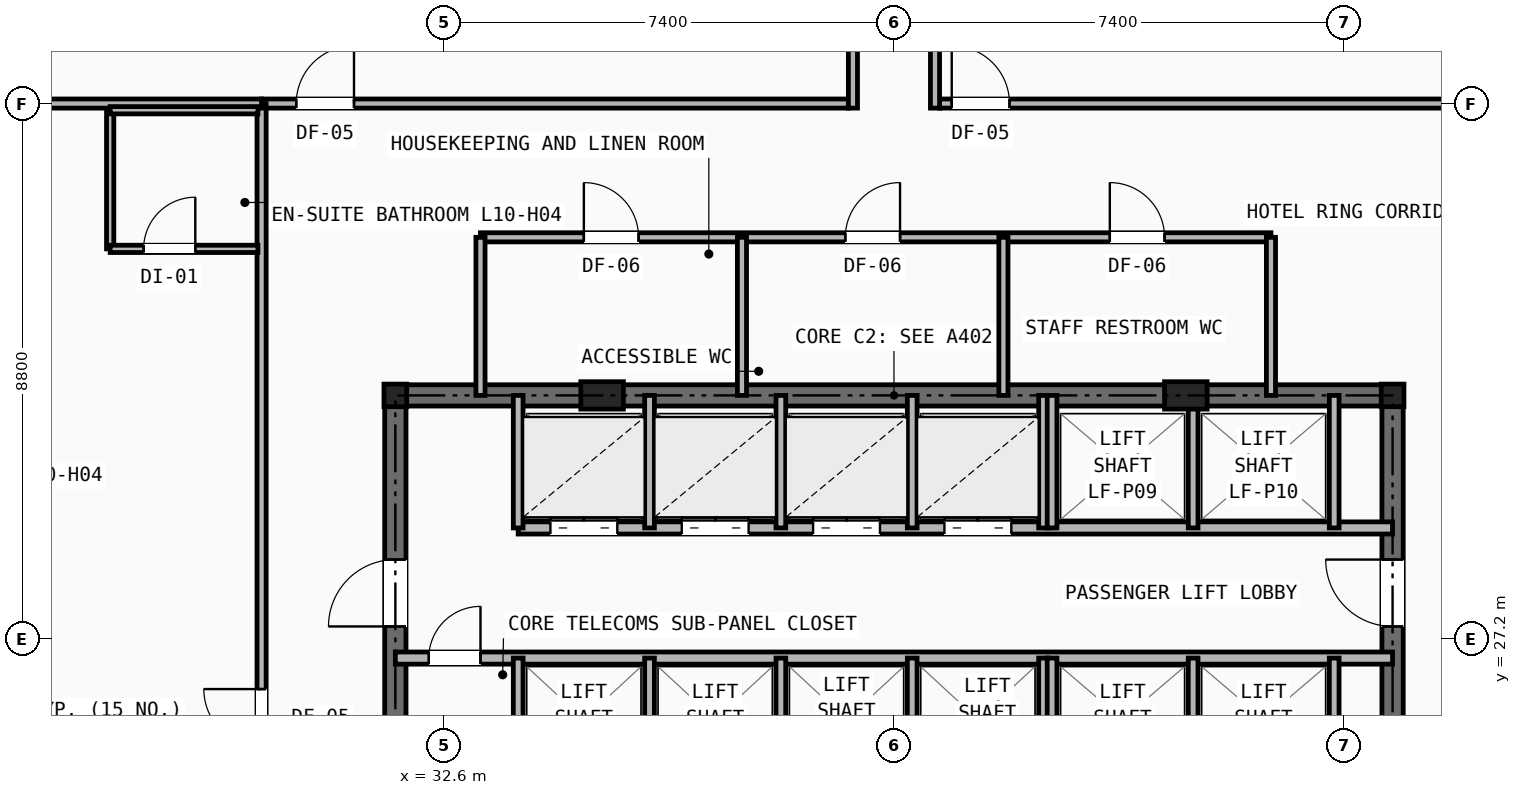
"""IFC4 building model, lengths in metres.
Left out: names, types, materials, properties, quantities, classifications, styles, units other than length and angle.
Written with IfcOpenShell. Run it as: python <this file> out.ifc"""

import sys

from ifc_helpers import new_model, si_unit, direction, frame, frame_2d, origin, origin_2d, place, context, subcontext, project, spatial, rectangle, i_section, extrude, element, fill, save


model = new_model("IFC4")
c1 = context("Model", 3, precision=1e-05, world=origin(), true_north=direction((0.0, 1.0)))
c2 = subcontext(c1, "Body", "Model", "MODEL_VIEW")
j1 = project(units=[si_unit("LENGTHUNIT", "METRE"), si_unit("PLANEANGLEUNIT", "RADIAN")], contexts=[c1])
p1 = place(None, origin())
s1 = spatial("IfcSite", under=j1, at=p1, CompositionType="ELEMENT")
p2 = place(p1, origin())
s2 = spatial("IfcBuilding", under=s1, at=p2, CompositionType="ELEMENT")
p3 = place(p2, frame((0.0, 0.0, 40.0)))
s3 = spatial("IfcBuildingStorey", under=s2, at=p3, CompositionType="ELEMENT", Elevation=40.0)
for number, where, z_axis, x_axis in (
    (1, (31.8, 31.2, 0.0), (0.0, 0.0, 1.0), (1.0, 0.0, 0.0)),
    (2, (48.2, 31.2, 0.0), (0.0, 0.0, 1.0), (1.0, 0.0, 0.0)),
):
    element("IfcColumn", number, at=place(p3, frame(where, z_axis=z_axis, x_axis=x_axis)), inside=s3, PredefinedType="COLUMN", context=c2, shape_type="SweptSolid", body=[
        extrude(i_section(OverallWidth=0.374, OverallDepth=0.372, WebThickness=0.016, FlangeThickness=0.026, at=origin_2d()), origin(), (0.0, 0.0, 1.0), 3.2),
    ])
for number, where, z_axis, x_axis in (
    (3, (35.2, 31.2, 0.0), (0.0, 0.0, 1.0), (1.0, 0.0, 0.0)),
    (4, (44.8, 31.2, 0.0), (0.0, 0.0, 1.0), (1.0, 0.0, 0.0)),
):
    element("IfcColumn", number, at=place(p3, frame(where, z_axis=z_axis, x_axis=x_axis)), inside=s3, PredefinedType="PILASTER", context=c2, shape_type="SweptSolid", body=[
        extrude(rectangle(XDim=0.7, YDim=0.45, at=origin_2d()), origin(), (0.0, 0.0, 1.0), 3.2),
    ])
p4 = place(p3, frame((31.8, 31.2, 0.0), z_axis=(0.0, 0.0, 1.0), x_axis=(1.0, 0.0, 0.0)))
e5 = element("IfcWall", 5, at=p4, inside=s3, PredefinedType="SHEAR", context=c2, shape_type="SweptSolid", body=[
    extrude(rectangle(XDim=16.4, YDim=0.35, at=frame_2d((8.2, 0.0))), origin(), (0.0, 0.0, 1.0), 2.98),
])
p5 = place(p3, frame((31.8, 16.4, 0.0), z_axis=(0.0, 0.0, 1.0), x_axis=(0.0, 1.0, 0.0)))
e6 = element("IfcWall", 6, at=p5, inside=s3, PredefinedType="SHEAR", context=c2, shape_type="SweptSolid", body=[
    extrude(rectangle(XDim=14.8, YDim=0.35, at=frame_2d((7.4, 0.0))), origin(), (0.0, 0.0, 1.0), 2.98),
])
p6 = place(p5, frame((11.0, 0.0, 0.0)))
e7 = element("IfcOpeningElement", 7, at=p6, cuts=e6, PredefinedType="OPENING", context=c2, shape_type="SweptSolid", body=[
    extrude(rectangle(XDim=1.1, YDim=2.15, at=frame_2d((0.55, 1.075))), frame((0.0, 0.185, 0.0), z_axis=(0.0, -1.0, 0.0), x_axis=(1.0, 0.0, 0.0)), (0.0, 0.0, 1.0), 0.37),
])
p7 = place(p3, frame((48.2, 16.4, 0.0), z_axis=(0.0, 0.0, 1.0), x_axis=(0.0, 1.0, 0.0)))
e8 = element("IfcWall", 8, at=p7, inside=s3, PredefinedType="SHEAR", context=c2, shape_type="SweptSolid", body=[
    extrude(rectangle(XDim=14.8, YDim=0.35, at=frame_2d((7.4, 0.0))), origin(), (0.0, 0.0, 1.0), 2.98),
])
p8 = place(p7, frame((11.0, 0.0, 0.0)))
e9 = element("IfcOpeningElement", 9, at=p8, cuts=e8, PredefinedType="OPENING", context=c2, shape_type="SweptSolid", body=[
    extrude(rectangle(XDim=1.1, YDim=2.15, at=frame_2d((0.55, 1.075))), frame((0.0, 0.185, 0.0), z_axis=(0.0, -1.0, 0.0), x_axis=(1.0, 0.0, 0.0)), (0.0, 0.0, 1.0), 0.37),
])
p9 = place(p3, frame((33.82, 29.02, 0.0), z_axis=(0.0, 0.0, 1.0), x_axis=(1.0, 0.0, 0.0)))
e10 = element("IfcWall", 10, at=p9, inside=s3, PredefinedType="SOLIDWALL", context=c2, shape_type="SweptSolid", body=[
    extrude(rectangle(XDim=14.38, YDim=0.2, at=frame_2d((7.19, 0.0))), origin(), (0.0, 0.0, 1.0), 2.431),
])
p10 = place(p9, frame((0.53, 0.0, 0.0)))
e11 = element("IfcOpeningElement", 11, at=p10, cuts=e10, PredefinedType="OPENING", context=c2, shape_type="SweptSolid", body=[
    extrude(rectangle(XDim=1.1, YDim=2.15, at=frame_2d((0.55, 1.075))), frame((0.0, 0.11, 0.0), z_axis=(0.0, -1.0, 0.0), x_axis=(1.0, 0.0, 0.0)), (0.0, 0.0, 1.0), 0.22),
])
p11 = place(p9, frame((2.69, 0.0, 0.0)))
e12 = element("IfcOpeningElement", 12, at=p11, cuts=e10, PredefinedType="OPENING", context=c2, shape_type="SweptSolid", body=[
    extrude(rectangle(XDim=1.1, YDim=2.15, at=frame_2d((0.55, 1.075))), frame((0.0, 0.11, 0.0), z_axis=(0.0, -1.0, 0.0), x_axis=(1.0, 0.0, 0.0)), (0.0, 0.0, 1.0), 0.22),
])
p12 = place(p9, frame((4.85, 0.0, 0.0)))
e13 = element("IfcOpeningElement", 13, at=p12, cuts=e10, PredefinedType="OPENING", context=c2, shape_type="SweptSolid", body=[
    extrude(rectangle(XDim=1.1, YDim=2.15, at=frame_2d((0.55, 1.075))), frame((0.0, 0.11, 0.0), z_axis=(0.0, -1.0, 0.0), x_axis=(1.0, 0.0, 0.0)), (0.0, 0.0, 1.0), 0.22),
])
p13 = place(p9, frame((7.01, 0.0, 0.0)))
e14 = element("IfcOpeningElement", 14, at=p13, cuts=e10, PredefinedType="OPENING", context=c2, shape_type="SweptSolid", body=[
    extrude(rectangle(XDim=1.1, YDim=2.15, at=frame_2d((0.55, 1.075))), frame((0.0, 0.11, 0.0), z_axis=(0.0, -1.0, 0.0), x_axis=(1.0, 0.0, 0.0)), (0.0, 0.0, 1.0), 0.22),
])
p14 = place(p3, frame((31.8, 26.88, 0.0), z_axis=(0.0, 0.0, 1.0), x_axis=(1.0, 0.0, 0.0)))
e15 = element("IfcWall", 15, at=p14, inside=s3, PredefinedType="SOLIDWALL", context=c2, shape_type="SweptSolid", body=[
    extrude(rectangle(XDim=16.4, YDim=0.2, at=frame_2d((8.2, 0.0))), origin(), (0.0, 0.0, 1.0), 2.431),
])
p15 = place(p14, frame((0.55, 0.0, 0.0)))
e16 = element("IfcOpeningElement", 16, at=p15, cuts=e15, PredefinedType="OPENING", context=c2, shape_type="SweptSolid", body=[
    extrude(rectangle(XDim=0.85, YDim=2.05, at=frame_2d((0.425, 1.025))), frame((0.0, 0.11, 0.0), z_axis=(0.0, -1.0, 0.0), x_axis=(1.0, 0.0, 0.0)), (0.0, 0.0, 1.0), 0.22),
])
p16 = place(p3, frame((33.82, 29.02, 0.0), z_axis=(0.0, 0.0, 1.0), x_axis=(0.0, 1.0, 0.0)))
e17 = element("IfcWall", 17, at=p16, inside=s3, PredefinedType="SOLIDWALL", context=c2, shape_type="SweptSolid", body=[
    extrude(rectangle(XDim=2.18, YDim=0.16, at=frame_2d((1.09, 0.0))), origin(), (0.0, 0.0, 1.0), 2.708),
])
p17 = place(p3, frame((33.82, 24.8, 0.0), z_axis=(0.0, 0.0, 1.0), x_axis=(0.0, 1.0, 0.0)))
e18 = element("IfcWall", 18, at=p17, inside=s3, PredefinedType="SOLIDWALL", context=c2, shape_type="SweptSolid", body=[
    extrude(rectangle(XDim=2.08, YDim=0.16, at=frame_2d((1.04, 0.0))), origin(), (0.0, 0.0, 1.0), 2.98),
])
for number, where, z_axis, x_axis in (
    (19, (35.98, 29.02, 0.0), (0.0, 0.0, 1.0), (0.0, 1.0, 0.0)),
    (20, (38.14, 29.02, 0.0), (0.0, 0.0, 1.0), (0.0, 1.0, 0.0)),
    (21, (40.3, 29.02, 0.0), (0.0, 0.0, 1.0), (0.0, 1.0, 0.0)),
    (22, (42.46, 29.02, 0.0), (0.0, 0.0, 1.0), (0.0, 1.0, 0.0)),
):
    element("IfcWall", number, at=place(p3, frame(where, z_axis=z_axis, x_axis=x_axis)), inside=s3, PredefinedType="SOLIDWALL", context=c2, shape_type="SweptSolid", body=[
        extrude(rectangle(XDim=2.18, YDim=0.16, at=frame_2d((1.09, 0.0))), origin(), (0.0, 0.0, 1.0), 2.708),
    ])
for number, where, z_axis, x_axis in (
    (23, (35.98, 24.8, 0.0), (0.0, 0.0, 1.0), (0.0, 1.0, 0.0)),
    (24, (38.14, 24.8, 0.0), (0.0, 0.0, 1.0), (0.0, 1.0, 0.0)),
    (25, (40.3, 24.8, 0.0), (0.0, 0.0, 1.0), (0.0, 1.0, 0.0)),
    (26, (42.46, 24.8, 0.0), (0.0, 0.0, 1.0), (0.0, 1.0, 0.0)),
):
    element("IfcWall", number, at=place(p3, frame(where, z_axis=z_axis, x_axis=x_axis)), inside=s3, PredefinedType="SOLIDWALL", context=c2, shape_type="SweptSolid", body=[
        extrude(rectangle(XDim=2.08, YDim=0.16, at=frame_2d((1.04, 0.0))), origin(), (0.0, 0.0, 1.0), 2.98),
    ])
for number, where, z_axis, x_axis in (
    (27, (42.6, 29.02, 0.0), (0.0, 0.0, 1.0), (0.0, 1.0, 0.0)),
    (28, (44.92, 29.02, 0.0), (0.0, 0.0, 1.0), (0.0, 1.0, 0.0)),
    (29, (47.24, 29.02, 0.0), (0.0, 0.0, 1.0), (0.0, 1.0, 0.0)),
):
    element("IfcWall", number, at=place(p3, frame(where, z_axis=z_axis, x_axis=x_axis)), inside=s3, PredefinedType="SOLIDWALL", context=c2, shape_type="SweptSolid", body=[
        extrude(rectangle(XDim=2.18, YDim=0.16, at=frame_2d((1.09, 0.0))), origin(), (0.0, 0.0, 1.0), 2.708),
    ])
for number, where, z_axis, x_axis in (
    (30, (42.6, 24.8, 0.0), (0.0, 0.0, 1.0), (0.0, 1.0, 0.0)),
    (31, (44.92, 24.8, 0.0), (0.0, 0.0, 1.0), (0.0, 1.0, 0.0)),
    (32, (47.24, 24.8, 0.0), (0.0, 0.0, 1.0), (0.0, 1.0, 0.0)),
):
    element("IfcWall", number, at=place(p3, frame(where, z_axis=z_axis, x_axis=x_axis)), inside=s3, PredefinedType="SOLIDWALL", context=c2, shape_type="SweptSolid", body=[
        extrude(rectangle(XDim=2.08, YDim=0.16, at=frame_2d((1.04, 0.0))), origin(), (0.0, 0.0, 1.0), 2.98),
    ])
p18 = place(p3, frame((33.2, 33.8, 0.0), z_axis=(0.0, 0.0, 1.0), x_axis=(1.0, 0.0, 0.0)))
e33 = element("IfcWall", 33, at=p18, inside=s3, PredefinedType="PARTITIONING", context=c2, shape_type="SweptSolid", body=[
    extrude(rectangle(XDim=13.0, YDim=0.15, at=frame_2d((6.5, 0.0))), origin(), (0.0, 0.0, 1.0), 2.98),
])
p19 = place(p18, frame((1.7, 0.0, 0.0)))
e34 = element("IfcOpeningElement", 34, at=p19, cuts=e33, PredefinedType="OPENING", context=c2, shape_type="SweptSolid", body=[
    extrude(rectangle(XDim=0.9, YDim=2.1, at=frame_2d((0.45, 1.05))), frame((0.0, 0.085, 0.0), z_axis=(0.0, -1.0, 0.0), x_axis=(1.0, 0.0, 0.0)), (0.0, 0.0, 1.0), 0.17),
])
p20 = place(p18, frame((6.0, 0.0, 0.0)))
e35 = element("IfcOpeningElement", 35, at=p20, cuts=e33, PredefinedType="OPENING", context=c2, shape_type="SweptSolid", body=[
    extrude(rectangle(XDim=0.9, YDim=2.1, at=frame_2d((0.45, 1.05))), frame((0.0, 0.085, 0.0), z_axis=(0.0, -1.0, 0.0), x_axis=(1.0, 0.0, 0.0)), (0.0, 0.0, 1.0), 0.17),
])
p21 = place(p18, frame((10.35, 0.0, 0.0)))
e36 = element("IfcOpeningElement", 36, at=p21, cuts=e33, PredefinedType="OPENING", context=c2, shape_type="SweptSolid", body=[
    extrude(rectangle(XDim=0.9, YDim=2.1, at=frame_2d((0.45, 1.05))), frame((0.0, 0.085, 0.0), z_axis=(0.0, -1.0, 0.0), x_axis=(1.0, 0.0, 0.0)), (0.0, 0.0, 1.0), 0.17),
])
for number, where, z_axis, x_axis in (
    (37, (33.2, 31.2, 0.0), (0.0, 0.0, 1.0), (0.0, 1.0, 0.0)),
    (38, (46.2, 31.2, 0.0), (0.0, 0.0, 1.0), (0.0, 1.0, 0.0)),
    (39, (37.5, 31.2, 0.0), (0.0, 0.0, 1.0), (0.0, 1.0, 0.0)),
    (40, (41.8, 31.2, 0.0), (0.0, 0.0, 1.0), (0.0, 1.0, 0.0)),
):
    element("IfcWall", number, at=place(p3, frame(where, z_axis=z_axis, x_axis=x_axis)), inside=s3, PredefinedType="PARTITIONING", context=c2, shape_type="SweptSolid", body=[
        extrude(rectangle(XDim=2.6, YDim=0.15, at=frame_2d((1.3, 0.0))), origin(), (0.0, 0.0, 1.0), 2.708),
    ])
p22 = place(p3, frame((29.6, 36.0, 0.0), z_axis=(0.0, 0.0, 1.0), x_axis=(1.0, 0.0, 0.0)))
e41 = element("IfcWall", 41, at=p22, inside=s3, PredefinedType="PARTITIONING", context=c2, shape_type="SweptSolid", body=[
    extrude(rectangle(XDim=9.65, YDim=0.15, at=frame_2d((4.825, 0.0))), origin(), (0.0, 0.0, 1.0), 2.98),
])
p23 = place(p22, frame((0.57, 0.0, 0.0)))
e42 = element("IfcOpeningElement", 42, at=p23, cuts=e41, PredefinedType="OPENING", context=c2, shape_type="SweptSolid", body=[
    extrude(rectangle(XDim=0.95, YDim=2.1, at=frame_2d((0.475, 1.05))), frame((0.0, 0.085, 0.0), z_axis=(0.0, -1.0, 0.0), x_axis=(1.0, 0.0, 0.0)), (0.0, 0.0, 1.0), 0.17),
])
p24 = place(p3, frame((40.75, 36.0, 0.0), z_axis=(0.0, 0.0, 1.0), x_axis=(1.0, 0.0, 0.0)))
e43 = element("IfcWall", 43, at=p24, inside=s3, PredefinedType="PARTITIONING", context=c2, shape_type="SweptSolid", body=[
    extrude(rectangle(XDim=9.65, YDim=0.15, at=frame_2d((4.825, 0.0))), origin(), (0.0, 0.0, 1.0), 2.513),
])
p25 = place(p24, frame((0.2, 0.0, 0.0)))
e44 = element("IfcOpeningElement", 44, at=p25, cuts=e43, PredefinedType="OPENING", context=c2, shape_type="SweptSolid", body=[
    extrude(rectangle(XDim=0.95, YDim=2.1, at=frame_2d((0.475, 1.05))), frame((0.0, 0.085, 0.0), z_axis=(0.0, -1.0, 0.0), x_axis=(1.0, 0.0, 0.0)), (0.0, 0.0, 1.0), 0.17),
])
p26 = place(p3, frame((29.6, 14.1, 0.0), z_axis=(0.0, 0.0, 1.0), x_axis=(0.0, 1.0, 0.0)))
e45 = element("IfcWall", 45, at=p26, inside=s3, PredefinedType="PARTITIONING", context=c2, shape_type="SweptSolid", body=[
    extrude(rectangle(XDim=21.9, YDim=0.15, at=frame_2d((10.95, 0.0))), origin(), (0.0, 0.0, 1.0), 2.431),
])
p27 = place(p26, frame((0.42, 0.0, 0.0)))
e46 = element("IfcOpeningElement", 46, at=p27, cuts=e45, PredefinedType="OPENING", context=c2, shape_type="SweptSolid", body=[
    extrude(rectangle(XDim=0.95, YDim=2.1, at=frame_2d((0.475, 1.05))), frame((0.0, 0.085, 0.0), z_axis=(0.0, -1.0, 0.0), x_axis=(1.0, 0.0, 0.0)), (0.0, 0.0, 1.0), 0.17),
])
p28 = place(p26, frame((11.32, 0.0, 0.0)))
e47 = element("IfcOpeningElement", 47, at=p28, cuts=e45, PredefinedType="OPENING", context=c2, shape_type="SweptSolid", body=[
    extrude(rectangle(XDim=0.95, YDim=2.1, at=frame_2d((0.475, 1.05))), frame((0.0, 0.085, 0.0), z_axis=(0.0, -1.0, 0.0), x_axis=(1.0, 0.0, 0.0)), (0.0, 0.0, 1.0), 0.17),
])
p29 = place(p3, frame((22.166, 36.0, 0.0), z_axis=(0.0, 0.0, 1.0), x_axis=(1.0, 0.0, 0.0)))
e48 = element("IfcWall", 48, at=p29, inside=s3, PredefinedType="PARTITIONING", context=c2, shape_type="SweptSolid", body=[
    extrude(rectangle(XDim=7.434, YDim=0.15, at=frame_2d((3.717, 0.0))), origin(), (0.0, 0.0, 1.0), 2.268),
])
p30 = place(p3, frame((27.11, 33.61, 0.0), z_axis=(0.0, 0.0, 1.0), x_axis=(0.0, 1.0, 0.0)))
e49 = element("IfcWall", 49, at=p30, inside=s3, PredefinedType="PARTITIONING", context=c2, shape_type="SweptSolid", body=[
    extrude(rectangle(XDim=2.28, YDim=0.12, at=frame_2d((1.14, 0.0))), origin(), (0.0, 0.0, 1.0), 2.513),
])
p31 = place(p3, frame((27.11, 33.61, 0.0), z_axis=(0.0, 0.0, 1.0), x_axis=(1.0, 0.0, 0.0)))
e50 = element("IfcWall", 50, at=p31, inside=s3, PredefinedType="PARTITIONING", context=c2, shape_type="SweptSolid", body=[
    extrude(rectangle(XDim=2.43, YDim=0.12, at=frame_2d((1.215, 0.0))), origin(), (0.0, 0.0, 1.0), 2.513),
])
p32 = place(p31, frame((0.55, 0.0, 0.0)))
e51 = element("IfcOpeningElement", 51, at=p32, cuts=e50, PredefinedType="OPENING", context=c2, shape_type="SweptSolid", body=[
    extrude(rectangle(XDim=0.85, YDim=2.05, at=frame_2d((0.425, 1.025))), frame((0.0, 0.07, 0.0), z_axis=(0.0, -1.0, 0.0), x_axis=(1.0, 0.0, 0.0)), (0.0, 0.0, 1.0), 0.14),
])
p33 = place(p3, frame((27.11, 35.89, 0.0), z_axis=(0.0, 0.0, 1.0), x_axis=(1.0, 0.0, 0.0)))
e52 = element("IfcWall", 52, at=p33, inside=s3, PredefinedType="PARTITIONING", context=c2, shape_type="SweptSolid", body=[
    extrude(rectangle(XDim=2.43, YDim=0.12, at=frame_2d((1.215, 0.0))), origin(), (0.0, 0.0, 1.0), 2.513),
])
for number, where, z_axis, x_axis in (
    (53, (39.325, 35.925, 0.0), (0.0, 0.0, 1.0), (0.0, 1.0, 0.0)),
    (54, (40.675, 35.925, 0.0), (0.0, 0.0, 1.0), (0.0, 1.0, 0.0)),
):
    element("IfcWall", number, at=place(p3, frame(where, z_axis=z_axis, x_axis=x_axis)), inside=s3, PredefinedType="PARTITIONING", context=c2, shape_type="SweptSolid", body=[
        extrude(rectangle(XDim=2.525, YDim=0.15, at=frame_2d((1.262, 0.0))), origin(), (0.0, 0.0, 1.0), 2.98),
    ])
p34 = place(p15, origin())
e55 = element("IfcDoor", 55, at=p34, inside=s3, OperationType="SINGLE_SWING_RIGHT", PredefinedType="DOOR", context=c2, shape_type="SweptSolid", body=[
    extrude(rectangle(XDim=0.85, YDim=2.05, at=frame_2d((0.425, 1.025))), frame((0.0, 0.025, 0.0), z_axis=(0.0, -1.0, 0.0), x_axis=(1.0, 0.0, 0.0)), (0.0, 0.0, 1.0), 0.05),
])
fill(e16, e55)
p35 = place(p6, origin())
e56 = element("IfcDoor", 56, at=p35, inside=s3, OperationType="SINGLE_SWING_LEFT", PredefinedType="DOOR", context=c2, shape_type="SweptSolid", body=[
    extrude(rectangle(XDim=1.1, YDim=2.15, at=frame_2d((0.55, 1.075))), frame((0.0, 0.025, 0.0), z_axis=(0.0, -1.0, 0.0), x_axis=(1.0, 0.0, 0.0)), (0.0, 0.0, 1.0), 0.05),
])
fill(e7, e56)
p36 = place(p8, origin())
e57 = element("IfcDoor", 57, at=p36, inside=s3, OperationType="SINGLE_SWING_RIGHT", PredefinedType="DOOR", context=c2, shape_type="SweptSolid", body=[
    extrude(rectangle(XDim=1.1, YDim=2.15, at=frame_2d((0.55, 1.075))), frame((0.0, 0.025, 0.0), z_axis=(0.0, -1.0, 0.0), x_axis=(1.0, 0.0, 0.0)), (0.0, 0.0, 1.0), 0.05),
])
fill(e9, e57)
p37 = place(p10, origin())
e58 = element("IfcDoor", 58, at=p37, inside=s3, OperationType="DOUBLE_DOOR_SLIDING", PredefinedType="DOOR", context=c2, shape_type="SweptSolid", body=[
    extrude(rectangle(XDim=1.1, YDim=2.15, at=frame_2d((0.55, 1.075))), frame((0.0, 0.025, 0.0), z_axis=(0.0, -1.0, 0.0), x_axis=(1.0, 0.0, 0.0)), (0.0, 0.0, 1.0), 0.05),
])
fill(e11, e58)
p38 = place(p11, origin())
e59 = element("IfcDoor", 59, at=p38, inside=s3, OperationType="DOUBLE_DOOR_SLIDING", PredefinedType="DOOR", context=c2, shape_type="SweptSolid", body=[
    extrude(rectangle(XDim=1.1, YDim=2.15, at=frame_2d((0.55, 1.075))), frame((0.0, 0.025, 0.0), z_axis=(0.0, -1.0, 0.0), x_axis=(1.0, 0.0, 0.0)), (0.0, 0.0, 1.0), 0.05),
])
fill(e12, e59)
p39 = place(p12, origin())
e60 = element("IfcDoor", 60, at=p39, inside=s3, OperationType="DOUBLE_DOOR_SLIDING", PredefinedType="DOOR", context=c2, shape_type="SweptSolid", body=[
    extrude(rectangle(XDim=1.1, YDim=2.15, at=frame_2d((0.55, 1.075))), frame((0.0, 0.025, 0.0), z_axis=(0.0, -1.0, 0.0), x_axis=(1.0, 0.0, 0.0)), (0.0, 0.0, 1.0), 0.05),
])
fill(e13, e60)
p40 = place(p13, origin())
e61 = element("IfcDoor", 61, at=p40, inside=s3, OperationType="DOUBLE_DOOR_SLIDING", PredefinedType="DOOR", context=c2, shape_type="SweptSolid", body=[
    extrude(rectangle(XDim=1.1, YDim=2.15, at=frame_2d((0.55, 1.075))), frame((0.0, 0.025, 0.0), z_axis=(0.0, -1.0, 0.0), x_axis=(1.0, 0.0, 0.0)), (0.0, 0.0, 1.0), 0.05),
])
fill(e14, e61)
p41 = place(p19, origin())
e62 = element("IfcDoor", 62, at=p41, inside=s3, OperationType="SINGLE_SWING_LEFT", PredefinedType="DOOR", context=c2, shape_type="SweptSolid", body=[
    extrude(rectangle(XDim=0.9, YDim=2.1, at=frame_2d((0.45, 1.05))), frame((0.0, 0.025, 0.0), z_axis=(0.0, -1.0, 0.0), x_axis=(1.0, 0.0, 0.0)), (0.0, 0.0, 1.0), 0.05),
])
fill(e34, e62)
p42 = place(p20, origin())
e63 = element("IfcDoor", 63, at=p42, inside=s3, OperationType="SINGLE_SWING_RIGHT", PredefinedType="DOOR", context=c2, shape_type="SweptSolid", body=[
    extrude(rectangle(XDim=0.9, YDim=2.1, at=frame_2d((0.45, 1.05))), frame((0.0, 0.025, 0.0), z_axis=(0.0, -1.0, 0.0), x_axis=(1.0, 0.0, 0.0)), (0.0, 0.0, 1.0), 0.05),
])
fill(e35, e63)
p43 = place(p21, origin())
e64 = element("IfcDoor", 64, at=p43, inside=s3, OperationType="SINGLE_SWING_LEFT", PredefinedType="DOOR", context=c2, shape_type="SweptSolid", body=[
    extrude(rectangle(XDim=0.9, YDim=2.1, at=frame_2d((0.45, 1.05))), frame((0.0, 0.025, 0.0), z_axis=(0.0, -1.0, 0.0), x_axis=(1.0, 0.0, 0.0)), (0.0, 0.0, 1.0), 0.05),
])
fill(e36, e64)
p44 = place(p28, origin())
e65 = element("IfcDoor", 65, at=p44, inside=s3, OperationType="SINGLE_SWING_RIGHT", PredefinedType="DOOR", context=c2, shape_type="SweptSolid", body=[
    extrude(rectangle(XDim=0.95, YDim=2.1, at=frame_2d((0.475, 1.05))), frame((0.0, 0.025, 0.0), z_axis=(0.0, -1.0, 0.0), x_axis=(1.0, 0.0, 0.0)), (0.0, 0.0, 1.0), 0.05),
])
fill(e47, e65)
p45 = place(p32, origin())
e66 = element("IfcDoor", 66, at=p45, inside=s3, OperationType="SINGLE_SWING_RIGHT", PredefinedType="DOOR", context=c2, shape_type="SweptSolid", body=[
    extrude(rectangle(XDim=0.85, YDim=2.05, at=frame_2d((0.425, 1.025))), frame((0.0, 0.025, 0.0), z_axis=(0.0, -1.0, 0.0), x_axis=(1.0, 0.0, 0.0)), (0.0, 0.0, 1.0), 0.05),
])
fill(e51, e66)
p46 = place(p23, origin())
e67 = element("IfcDoor", 67, at=p46, inside=s3, OperationType="SINGLE_SWING_RIGHT", PredefinedType="DOOR", context=c2, shape_type="SweptSolid", body=[
    extrude(rectangle(XDim=0.95, YDim=2.1, at=frame_2d((0.475, 1.05))), frame((0.0, 0.025, 0.0), z_axis=(0.0, -1.0, 0.0), x_axis=(1.0, 0.0, 0.0)), (0.0, 0.0, 1.0), 0.05),
])
fill(e42, e67)
p47 = place(p25, origin())
e68 = element("IfcDoor", 68, at=p47, inside=s3, OperationType="SINGLE_SWING_LEFT", PredefinedType="DOOR", context=c2, shape_type="SweptSolid", body=[
    extrude(rectangle(XDim=0.95, YDim=2.1, at=frame_2d((0.475, 1.05))), frame((0.0, 0.025, 0.0), z_axis=(0.0, -1.0, 0.0), x_axis=(1.0, 0.0, 0.0)), (0.0, 0.0, 1.0), 0.05),
])
fill(e44, e68)
save(model, sys.argv[1])
